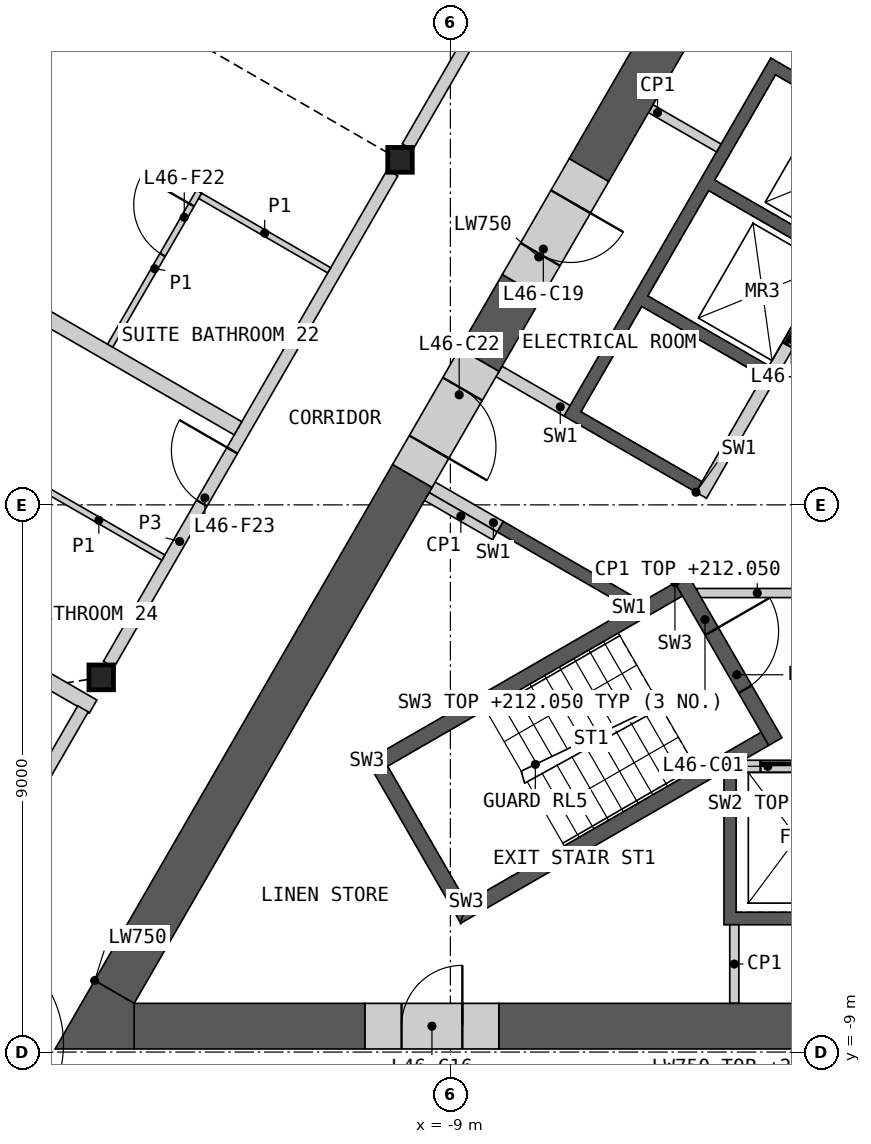
"""IFC4 building model, lengths in metres.
Left out: names, types, materials, properties, quantities, classifications, styles, units other than length and angle.
Written with IfcOpenShell. Run it as: python <this file> out.ifc"""

import sys

from ifc_helpers import new_model, si_unit, direction, frame, frame_2d, origin, origin_2d, place, context, subcontext, project, spatial, polyline, rectangle, i_section, outline, extrude, element, fill, save


model = new_model("IFC4")
c1 = context("Model", 3, precision=1e-05, world=origin(), true_north=direction((0.0, 1.0)))
c2 = subcontext(c1, "Body", "Model", "MODEL_VIEW")
j1 = project(units=[si_unit("LENGTHUNIT", "METRE"), si_unit("PLANEANGLEUNIT", "RADIAN")], contexts=[c1])
p1 = place(None, origin())
s1 = spatial("IfcSite", under=j1, at=p1, CompositionType="ELEMENT")
p2 = place(p1, origin())
s2 = spatial("IfcBuilding", under=s1, at=p2, CompositionType="ELEMENT")
p3 = place(p2, frame((0.0, 0.0, 208.8)))
s3 = spatial("IfcBuildingStorey", under=s2, at=p3, CompositionType="ELEMENT", Elevation=208.8)
for number, where, z_axis, x_axis in (
    (1, (-9.828, 5.675, 0.0), (0.0, 0.0, 1.0), (1.0, 0.0, 0.0)),
    (2, (-14.743, -2.837, 0.0), (0.0, 0.0, 1.0), (1.0, 0.0, 0.0)),
):
    element("IfcColumn", number, at=place(p3, frame(where, z_axis=z_axis, x_axis=x_axis)), inside=s3, PredefinedType="COLUMN", context=c2, shape_type="SweptSolid", body=[
        extrude(i_section(OverallWidth=0.404, OverallDepth=0.407, WebThickness=0.027, FlangeThickness=0.044, at=origin_2d()), origin(), (0.0, 0.0, 1.0), 3.6),
    ])
p4 = place(p3, origin())
e3 = element("IfcWall", 3, at=p4, inside=s3, PredefinedType="SHEAR", context=c2, shape_type="SweptSolid", body=[
    extrude(outline(polyline([(0.1, -4.4), (0.1, -6.906), (-4.5, -6.906), (-4.5, -4.4), (-4.3, -4.4), (-4.3, -6.7), (-2.3, -6.7), (-2.3, -4.4), (-2.1, -4.4), (-2.1, -6.7), (-0.1, -6.7), (-0.1, -4.4), (0.1, -4.4)])), origin(), (0.0, 0.0, 1.0), 3.25),
])
p5 = place(p3, frame((-4.187, -4.3, 0.0), z_axis=(0.0, 0.0, 1.0), x_axis=(1.0, 0.0, 0.0)))
e4 = element("IfcWall", 4, at=p5, inside=s3, PredefinedType="SOLIDWALL", context=c2, shape_type="SweptSolid", body=[
    extrude(rectangle(XDim=8.373, YDim=0.2, at=frame_2d((4.187, 0.0))), origin(), (0.0, 0.0, 1.0), 3.25),
])
p6 = place(p5, frame((0.287, 0.0, 0.0)))
e5 = element("IfcOpeningElement", 5, at=p6, cuts=e4, PredefinedType="OPENING", context=c2, shape_type="SweptSolid", body=[
    extrude(rectangle(XDim=1.2, YDim=2.1, at=frame_2d((0.6, 1.05))), frame((0.0, 0.11, 0.0), z_axis=(0.0, -1.0, 0.0), x_axis=(1.0, 0.0, 0.0)), (0.0, 0.0, 1.0), 0.22),
])
p7 = place(p5, frame((2.387, 0.0, 0.0)))
e6 = element("IfcOpeningElement", 6, at=p7, cuts=e4, PredefinedType="OPENING", context=c2, shape_type="SweptSolid", body=[
    extrude(rectangle(XDim=1.4, YDim=2.1, at=frame_2d((0.7, 1.05))), frame((0.0, 0.11, 0.0), z_axis=(0.0, -1.0, 0.0), x_axis=(1.0, 0.0, 0.0)), (0.0, 0.0, 1.0), 0.22),
])
p8 = place(p5, frame((4.837, 0.0, 0.0)))
e7 = element("IfcOpeningElement", 7, at=p8, cuts=e4, PredefinedType="OPENING", context=c2, shape_type="SweptSolid", body=[
    extrude(rectangle(XDim=0.9, YDim=2.1, at=frame_2d((0.45, 1.05))), frame((0.0, 0.11, 0.0), z_axis=(0.0, -1.0, 0.0), x_axis=(1.0, 0.0, 0.0)), (0.0, 0.0, 1.0), 0.22),
])
p9 = place(p5, frame((6.887, 0.0, 0.0)))
e8 = element("IfcOpeningElement", 8, at=p9, cuts=e4, PredefinedType="OPENING", context=c2, shape_type="SweptSolid", body=[
    extrude(rectangle(XDim=1.2, YDim=2.1, at=frame_2d((0.6, 1.05))), frame((0.0, 0.11, 0.0), z_axis=(0.0, -1.0, 0.0), x_axis=(1.0, 0.0, 0.0)), (0.0, 0.0, 1.0), 0.22),
])
p10 = place(p3, origin())
e9 = element("IfcWall", 9, at=p10, inside=s3, PredefinedType="SHEAR", context=c2, shape_type="SweptSolid", body=[
    extrude(outline(polyline([(-6.061, -1.697), (-8.231, -0.444), (-8.131, -0.271), (-5.96, -1.524), (-6.061, -1.697)])), origin(), (0.0, 0.0, 1.0), 3.25),
])
p11 = place(p3, origin())
e10 = element("IfcWall", 10, at=p11, inside=s3, PredefinedType="SHEAR", context=c2, shape_type="SweptSolid", body=[
    extrude(outline(polyline([(-4.96, 0.208), (-7.131, 1.461), (-3.731, 7.35), (-1.561, 6.097), (-1.66, 5.924), (-3.652, 7.074), (-4.652, 5.342), (-2.66, 4.192), (-2.76, 4.019), (-4.752, 5.169), (-5.752, 3.437), (-3.76, 2.287), (-3.861, 2.113), (-5.852, 3.263), (-6.852, 1.531), (-4.861, 0.381), (-4.96, 0.208)])), origin(), (0.0, 0.0, 1.0), 3.25),
])
p12 = place(p3, frame((-1.631, 5.776, 0.0), z_axis=(0.0, 0.0, 1.0), x_axis=(-0.499992876559, -0.866029516466, 0.0)))
e11 = element("IfcWall", 11, at=p12, inside=s3, PredefinedType="SOLIDWALL", context=c2, shape_type="SweptSolid", body=[
    extrude(rectangle(XDim=6.486, YDim=0.2, at=frame_2d((3.243, 0.0))), origin(), (0.0, 0.0, 1.0), 3.25),
])
p13 = place(p12, frame((0.337, 0.0, 0.0)))
e12 = element("IfcOpeningElement", 12, at=p13, cuts=e11, PredefinedType="OPENING", context=c2, shape_type="SweptSolid", body=[
    extrude(rectangle(XDim=1.1, YDim=2.1, at=frame_2d((0.55, 1.05))), frame((0.0, 0.11, 0.0), z_axis=(0.0, -1.0, 0.0), x_axis=(1.0, 0.0, 0.0)), (0.0, 0.0, 1.0), 0.22),
])
p14 = place(p12, frame((2.537, 0.0, 0.0)))
e13 = element("IfcOpeningElement", 13, at=p14, cuts=e11, PredefinedType="OPENING", context=c2, shape_type="SweptSolid", body=[
    extrude(rectangle(XDim=1.1, YDim=2.1, at=frame_2d((0.55, 1.05))), frame((0.0, 0.11, 0.0), z_axis=(0.0, -1.0, 0.0), x_axis=(1.0, 0.0, 0.0)), (0.0, 0.0, 1.0), 0.22),
])
for number, where, z_axis, x_axis in (
    (14, (-7.081, 1.548, 0.0), (0.0, 0.0, 1.0), (-0.866, 0.5, 0.0)),
    (15, (-8.181, -0.357, 0.0), (0.0, 0.0, 1.0), (-0.866, 0.5, 0.0)),
):
    element("IfcWall", number, at=place(p3, frame(where, z_axis=z_axis, x_axis=x_axis)), inside=s3, PredefinedType="SHEAR", context=c2, shape_type="SweptSolid", body=[
        extrude(rectangle(XDim=1.293, YDim=0.2, at=frame_2d((0.646, 0.0))), origin(), (0.0, 0.0, 1.0), 3.25),
    ])
p15 = place(p3, frame((-4.941, -1.45, 0.0), z_axis=(0.0, 0.0, 1.0), x_axis=(1.0, 0.0, 0.0)))
e16 = element("IfcWall", 16, at=p15, inside=s3, PredefinedType="PARTITIONING", context=c2, shape_type="SweptSolid", body=[
    extrude(rectangle(XDim=9.882, YDim=0.15, at=frame_2d((4.941, 0.0))), origin(), (0.0, 0.0, 1.0), 3.25),
])
p16 = place(p15, frame((4.391, 0.0, 0.0)))
e17 = element("IfcOpeningElement", 17, at=p16, cuts=e16, PredefinedType="OPENING", context=c2, shape_type="SweptSolid", body=[
    extrude(rectangle(XDim=1.1, YDim=2.1, at=frame_2d((0.55, 1.05))), frame((0.0, 0.085, 0.0), z_axis=(0.0, -1.0, 0.0), x_axis=(1.0, 0.0, 0.0)), (0.0, 0.0, 1.0), 0.17),
])
p17 = place(p3, origin())
e18 = element("IfcWall", 18, at=p17, inside=s3, PredefinedType="SHEAR", context=c2, shape_type="SweptSolid", body=[
    extrude(outline(polyline([(-5.307, -1.281), (-10.374, -4.206), (-10.032, -4.298), (-5.182, -1.498), (-5.307, -1.281)])), origin(), (0.0, 0.0, 1.0), 3.25),
])
p18 = place(p3, origin())
e19 = element("IfcWall", 19, at=p18, inside=s3, PredefinedType="SHEAR", context=c2, shape_type="SweptSolid", body=[
    extrude(outline(polyline([(-10.374, -4.206), (-8.83, -6.881), (-8.738, -6.539), (-10.032, -4.298), (-10.374, -4.206)])), origin(), (0.0, 0.0, 1.0), 3.25),
])
p19 = place(p3, origin())
e20 = element("IfcWall", 20, at=p19, inside=s3, PredefinedType="SHEAR", context=c2, shape_type="SweptSolid", body=[
    extrude(outline(polyline([(-8.738, -6.539), (-8.83, -6.881), (-3.763, -3.956), (-3.888, -3.739), (-8.738, -6.539)])), origin(), (0.0, 0.0, 1.0), 3.25),
])
p20 = place(p3, frame((-5.199, -1.219, 0.0), z_axis=(0.0, 0.0, 1.0), x_axis=(0.499982516597, -0.866035497597, 0.0)))
e21 = element("IfcWall", 21, at=p20, inside=s3, PredefinedType="SHEAR", context=c2, shape_type="SweptSolid", body=[
    extrude(rectangle(XDim=3.088, YDim=0.25, at=frame_2d((1.544, 0.0))), origin(), (0.0, 0.0, 1.0), 3.25),
])
p21 = place(p20, frame((0.994, 0.0, 0.0)))
e22 = element("IfcOpeningElement", 22, at=p21, cuts=e21, PredefinedType="OPENING", context=c2, shape_type="SweptSolid", body=[
    extrude(rectangle(XDim=1.1, YDim=2.1, at=frame_2d((0.55, 1.05))), frame((0.0, 0.135, 0.0), z_axis=(0.0, -1.0, 0.0), x_axis=(1.0, 0.0, 0.0)), (0.0, 0.0, 1.0), 0.27),
])
for number, where, z_axis, x_axis in (
    (23, (-8.268, -0.509, 0.0), (0.0, 0.0, 1.0), (-0.866, 0.5, 0.0)),
    (24, (-5.705, 6.516, 0.0), (0.0, 0.0, 1.0), (0.866, -0.5, 0.0)),
    (25, (-4.33, -8.199, 0.0), (0.0, 0.0, 1.0), (0.0, 1.0, 0.0)),
):
    element("IfcWall", number, at=place(p3, frame(where, z_axis=z_axis, x_axis=x_axis)), inside=s3, PredefinedType="PARTITIONING", context=c2, shape_type="SweptSolid", body=[
        extrude(rectangle(XDim=1.293, YDim=0.15, at=frame_2d((0.646, 0.0))), origin(), (0.0, 0.0, 1.0), 3.25),
    ])
p22 = place(p3, frame((-8.203, -8.574, 0.0), z_axis=(0.0, 0.0, 1.0), x_axis=(1.0, 0.0, 0.0)))
e26 = element("IfcWall", 26, at=p22, inside=s3, PredefinedType="SHEAR", context=c2, shape_type="SweptSolid", body=[
    extrude(rectangle(XDim=4.926, YDim=0.75, at=frame_2d((2.463, 0.0))), origin(), (0.0, 0.0, 1.0), 3.25),
])
p23 = place(p3, frame((-14.201, -8.574, 0.0), z_axis=(0.0, 0.0, 1.0), x_axis=(1.0, 0.0, 0.0)))
e27 = element("IfcWall", 27, at=p23, inside=s3, PredefinedType="SHEAR", context=c2, shape_type="SweptSolid", body=[
    extrude(rectangle(XDim=3.798, YDim=0.75, at=frame_2d((1.899, 0.0))), origin(), (0.0, 0.0, 1.0), 3.25),
])
p24 = place(p3, frame((-9.625, 0.477, 0.0), z_axis=(0.0, 0.0, 1.0), x_axis=(-0.499986234705, -0.866033351035, 0.0)))
e28 = element("IfcWall", 28, at=p24, inside=s3, PredefinedType="SHEAR", context=c2, shape_type="SweptSolid", body=[
    extrude(rectangle(XDim=9.801, YDim=0.75, at=frame_2d((4.9, 0.0))), origin(), (0.0, 0.0, 1.0), 3.25),
])
p25 = place(p3, frame((-3.708, 10.724, 0.0), z_axis=(0.0, 0.0, 1.0), x_axis=(-0.500021737671, -0.866012853171, 0.0)))
e29 = element("IfcWall", 29, at=p25, inside=s3, PredefinedType="SHEAR", context=c2, shape_type="SweptSolid", body=[
    extrude(rectangle(XDim=6.026, YDim=0.75, at=frame_2d((3.013, 0.0))), origin(), (0.0, 0.0, 1.0), 3.25),
])
p26 = place(p3, frame((-7.821, 3.601, 0.0), z_axis=(0.0, 0.0, 1.0), x_axis=(-0.49996263964, -0.866046972724, 0.0)))
e30 = element("IfcWall", 30, at=p26, inside=s3, PredefinedType="SHEAR", context=c2, shape_type="SweptSolid", body=[
    extrude(rectangle(XDim=1.408, YDim=0.75, at=frame_2d((0.704, 0.0))), origin(), (0.0, 0.0, 1.0), 3.25),
])
p27 = place(p3, origin())
e31 = element("IfcWall", 31, at=p27, inside=s3, PredefinedType="SHEAR", context=c2, shape_type="SweptSolid", body=[
    extrude(outline(polyline([(-14.851, -7.824), (-14.201, -8.199), (-14.201, -8.949), (-15.5, -8.949), (-14.851, -7.824)])), origin(), (0.0, 0.0, 1.0), 3.25),
])
p28 = place(p3, frame((-10.403, -8.574, 0.0), z_axis=(0.0, 0.0, 1.0), x_axis=(1.0, 0.0, 0.0)))
e32 = element("IfcWall", 32, at=p28, inside=s3, PredefinedType="SHEAR", context=c2, shape_type="SweptSolid", body=[
    extrude(rectangle(XDim=2.2, YDim=0.75, at=frame_2d((1.1, 0.0))), origin(), (0.0, 0.0, 1.0), 3.25),
])
p29 = place(p28, frame((0.6, 0.0, 0.0)))
e33 = element("IfcOpeningElement", 33, at=p29, cuts=e32, PredefinedType="OPENING", context=c2, shape_type="SweptSolid", body=[
    extrude(rectangle(XDim=1.0, YDim=2.1, at=frame_2d((0.5, 1.05))), frame((0.0, 0.385, 0.0), z_axis=(0.0, -1.0, 0.0), x_axis=(1.0, 0.0, 0.0)), (0.0, 0.0, 1.0), 0.77),
])
p30 = place(p3, frame((-6.721, 5.506, 0.0), z_axis=(0.0, 0.0, 1.0), x_axis=(-0.499946605688, -0.86605622881, 0.0)))
e34 = element("IfcWall", 34, at=p30, inside=s3, PredefinedType="SHEAR", context=c2, shape_type="SweptSolid", body=[
    extrude(rectangle(XDim=2.2, YDim=0.75, at=frame_2d((1.1, 0.0))), origin(), (0.0, 0.0, 1.0), 3.25),
])
p31 = place(p30, frame((0.6, 0.0, 0.0)))
e35 = element("IfcOpeningElement", 35, at=p31, cuts=e34, PredefinedType="OPENING", context=c2, shape_type="SweptSolid", body=[
    extrude(rectangle(XDim=1.0, YDim=2.1, at=frame_2d((0.5, 1.05))), frame((0.0, 0.385, 0.0), z_axis=(0.0, -1.0, 0.0), x_axis=(1.0, 0.0, 0.0)), (0.0, 0.0, 1.0), 0.77),
])
p32 = place(p3, frame((-8.525, 2.382, 0.0), z_axis=(0.0, 0.0, 1.0), x_axis=(-0.500077893725, -0.86598042715, 0.0)))
e36 = element("IfcWall", 36, at=p32, inside=s3, PredefinedType="SHEAR", context=c2, shape_type="SweptSolid", body=[
    extrude(rectangle(XDim=2.2, YDim=0.75, at=frame_2d((1.1, 0.0))), origin(), (0.0, 0.0, 1.0), 3.25),
])
p33 = place(p32, frame((0.55, 0.0, 0.0)))
e37 = element("IfcOpeningElement", 37, at=p33, cuts=e36, PredefinedType="OPENING", context=c2, shape_type="SweptSolid", body=[
    extrude(rectangle(XDim=1.1, YDim=2.1, at=frame_2d((0.55, 1.05))), frame((0.0, 0.385, 0.0), z_axis=(0.0, -1.0, 0.0), x_axis=(1.0, 0.0, 0.0)), (0.0, 0.0, 1.0), 0.77),
])
p34 = place(p3, frame((-26.164, 3.199, 0.0), z_axis=(0.0, 0.0, 1.0), x_axis=(0.866029635251, -0.499992670813, 0.0)))
e38 = element("IfcWall", 38, at=p34, inside=s3, PredefinedType="PARTITIONING", context=c2, shape_type="SweptSolid", body=[
    extrude(rectangle(XDim=13.035, YDim=0.25, at=frame_2d((6.518, 0.0))), origin(), (0.0, 0.0, 1.0), 2.404),
])
p35 = place(p3, frame((-9.705, 5.888, 0.0), z_axis=(0.0, 0.0, 1.0), x_axis=(0.50000393355, 0.866023132736, 0.0)))
e39 = element("IfcWall", 39, at=p35, inside=s3, PredefinedType="PARTITIONING", context=c2, shape_type="SweptSolid", body=[
    extrude(rectangle(XDim=9.335, YDim=0.2, at=frame_2d((4.667, 0.0))), origin(), (0.0, 0.0, 1.0), 3.25),
])
p36 = place(p35, frame((3.465, 0.0, 0.0)))
e40 = element("IfcOpeningElement", 40, at=p36, cuts=e39, PredefinedType="OPENING", context=c2, shape_type="SweptSolid", body=[
    extrude(rectangle(XDim=1.1, YDim=2.1, at=frame_2d((0.55, 1.05))), frame((0.0, 0.11, 0.0), z_axis=(0.0, -1.0, 0.0), x_axis=(1.0, 0.0, 0.0)), (0.0, 0.0, 1.0), 0.22),
])
p37 = place(p3, frame((-14.619, -2.624, 0.0), z_axis=(0.0, 0.0, 1.0), x_axis=(0.50000393355, 0.866023132736, 0.0)))
e41 = element("IfcWall", 41, at=p37, inside=s3, PredefinedType="PARTITIONING", context=c2, shape_type="SweptSolid", body=[
    extrude(rectangle(XDim=9.335, YDim=0.2, at=frame_2d((4.667, 0.0))), origin(), (0.0, 0.0, 1.0), 3.25),
])
p38 = place(p37, frame((3.062, 0.0, 0.0)))
e42 = element("IfcOpeningElement", 42, at=p38, cuts=e41, PredefinedType="OPENING", context=c2, shape_type="SweptSolid", body=[
    extrude(rectangle(XDim=1.0, YDim=2.1, at=frame_2d((0.5, 1.05))), frame((0.0, 0.11, 0.0), z_axis=(0.0, -1.0, 0.0), x_axis=(1.0, 0.0, 0.0)), (0.0, 0.0, 1.0), 0.22),
])
p39 = place(p3, frame((-19.555, 5.337, 0.0), z_axis=(0.0, 0.0, 1.0), x_axis=(0.866023543838, -0.500003221507, 0.0)))
e43 = element("IfcWall", 43, at=p39, inside=s3, PredefinedType="PARTITIONING", context=c2, shape_type="SweptSolid", body=[
    extrude(rectangle(XDim=8.154, YDim=0.25, at=frame_2d((4.077, 0.0))), origin(), (0.0, 0.0, 1.0), 2.404),
])
p40 = place(p3, frame((-17.744, -8.035, 0.0), z_axis=(0.0, 0.0, 1.0), x_axis=(0.500020937221, 0.866013315337, 0.0)))
e44 = element("IfcWall", 44, at=p40, inside=s3, PredefinedType="PARTITIONING", context=c2, shape_type="SweptSolid", body=[
    extrude(rectangle(XDim=5.405, YDim=0.2, at=frame_2d((2.702, 0.0))), origin(), (0.0, 0.0, 1.0), 3.25),
])
p41 = place(p40, frame((0.35, 0.0, 0.0)))
e45 = element("IfcOpeningElement", 45, at=p41, cuts=e44, PredefinedType="OPENING", context=c2, shape_type="SweptSolid", body=[
    extrude(rectangle(XDim=1.1, YDim=2.1, at=frame_2d((0.55, 1.05))), frame((0.0, 0.11, 0.0), z_axis=(0.0, -1.0, 0.0), x_axis=(1.0, 0.0, 0.0)), (0.0, 0.0, 1.0), 0.22),
])
p42 = place(p3, frame((-14.595, 2.618, 0.0), z_axis=(0.0, 0.0, 1.0), x_axis=(0.500062034277, 0.865989585315, 0.0)))
e46 = element("IfcWall", 46, at=p42, inside=s3, PredefinedType="PARTITIONING", context=c2, shape_type="SweptSolid", body=[
    extrude(rectangle(XDim=2.925, YDim=0.1, at=frame_2d((1.462, 0.0))), origin(), (0.0, 0.0, 1.0), 2.404),
])
p43 = place(p42, frame((1.725, 0.0, 0.0)))
e47 = element("IfcOpeningElement", 47, at=p43, cuts=e46, PredefinedType="OPENING", context=c2, shape_type="SweptSolid", body=[
    extrude(rectangle(XDim=0.95, YDim=2.1, at=frame_2d((0.475, 1.05))), frame((0.0, 0.06, 0.0), z_axis=(0.0, -1.0, 0.0), x_axis=(1.0, 0.0, 0.0)), (0.0, 0.0, 1.0), 0.12),
])
p44 = place(p3, frame((-15.843, 0.358, 0.0), z_axis=(0.0, 0.0, 1.0), x_axis=(0.866014668023, -0.500018594424, 0.0)))
e48 = element("IfcWall", 48, at=p44, inside=s3, PredefinedType="PARTITIONING", context=c2, shape_type="SweptSolid", body=[
    extrude(rectangle(XDim=2.45, YDim=0.1, at=frame_2d((1.225, 0.0))), origin(), (0.0, 0.0, 1.0), 2.404),
])
p45 = place(p3, frame((-13.115, 5.083, 0.0), z_axis=(0.0, 0.0, 1.0), x_axis=(0.866032905446, -0.499987006516, 0.0)))
e49 = element("IfcWall", 49, at=p45, inside=s3, PredefinedType="PARTITIONING", context=c2, shape_type="SweptSolid", body=[
    extrude(rectangle(XDim=2.45, YDim=0.1, at=frame_2d((1.225, 0.0))), origin(), (0.0, 0.0, 1.0), 2.404),
])
p46 = place(p6, origin())
e50 = element("IfcDoor", 50, at=p46, inside=s3, OperationType="SLIDING_TO_LEFT", PredefinedType="DOOR", context=c2, shape_type="SweptSolid", body=[
    extrude(rectangle(XDim=1.2, YDim=2.1, at=frame_2d((0.6, 1.05))), frame((0.0, 0.025, 0.0), z_axis=(0.0, -1.0, 0.0), x_axis=(1.0, 0.0, 0.0)), (0.0, 0.0, 1.0), 0.05),
])
fill(e5, e50)
p47 = place(p14, origin())
e51 = element("IfcDoor", 51, at=p47, inside=s3, OperationType="SLIDING_TO_LEFT", PredefinedType="DOOR", context=c2, shape_type="SweptSolid", body=[
    extrude(rectangle(XDim=1.1, YDim=2.1, at=frame_2d((0.55, 1.05))), frame((0.0, 0.025, 0.0), z_axis=(0.0, -1.0, 0.0), x_axis=(1.0, 0.0, 0.0)), (0.0, 0.0, 1.0), 0.05),
])
fill(e13, e51)
p48 = place(p21, origin())
e52 = element("IfcDoor", 52, at=p48, inside=s3, OperationType="SINGLE_SWING_LEFT", PredefinedType="DOOR", context=c2, shape_type="SweptSolid", body=[
    extrude(rectangle(XDim=1.1, YDim=2.1, at=frame_2d((0.55, 1.05))), frame((0.0, 0.025, 0.0), z_axis=(0.0, -1.0, 0.0), x_axis=(1.0, 0.0, 0.0)), (0.0, 0.0, 1.0), 0.05),
])
fill(e22, e52)
p49 = place(p29, origin())
e53 = element("IfcDoor", 53, at=p49, inside=s3, OperationType="SINGLE_SWING_RIGHT", PredefinedType="DOOR", context=c2, shape_type="SweptSolid", body=[
    extrude(rectangle(XDim=1.0, YDim=2.1, at=frame_2d((0.5, 1.05))), frame((0.0, 0.13, 0.0), z_axis=(0.0, -1.0, 0.0), x_axis=(1.0, 0.0, 0.0)), (0.0, 0.0, 1.0), 0.05),
])
fill(e33, e53)
p50 = place(p31, origin())
e54 = element("IfcDoor", 54, at=p50, inside=s3, OperationType="SINGLE_SWING_LEFT", PredefinedType="DOOR", context=c2, shape_type="SweptSolid", body=[
    extrude(rectangle(XDim=1.0, YDim=2.1, at=frame_2d((0.5, 1.05))), frame((0.0, 0.13, 0.0), z_axis=(0.0, -1.0, 0.0), x_axis=(1.0, 0.0, 0.0)), (0.0, 0.0, 1.0), 0.05),
])
fill(e35, e54)
p51 = place(p33, origin())
e55 = element("IfcDoor", 55, at=p51, inside=s3, OperationType="SINGLE_SWING_RIGHT", PredefinedType="DOOR", context=c2, shape_type="SweptSolid", body=[
    extrude(rectangle(XDim=1.1, YDim=2.1, at=frame_2d((0.55, 1.05))), frame((0.0, 0.13, 0.0), z_axis=(0.0, -1.0, 0.0), x_axis=(1.0, 0.0, 0.0)), (0.0, 0.0, 1.0), 0.05),
])
fill(e37, e55)
p52 = place(p43, origin())
e56 = element("IfcDoor", 56, at=p52, inside=s3, OperationType="SINGLE_SWING_RIGHT", PredefinedType="DOOR", context=c2, shape_type="SweptSolid", body=[
    extrude(rectangle(XDim=0.95, YDim=2.1, at=frame_2d((0.475, 1.05))), frame((0.0, 0.025, 0.0), z_axis=(0.0, -1.0, 0.0), x_axis=(1.0, 0.0, 0.0)), (0.0, 0.0, 1.0), 0.05),
])
fill(e47, e56)
p53 = place(p38, origin())
e57 = element("IfcDoor", 57, at=p53, inside=s3, OperationType="SINGLE_SWING_RIGHT", PredefinedType="DOOR", context=c2, shape_type="SweptSolid", body=[
    extrude(rectangle(XDim=1.0, YDim=2.1, at=frame_2d((0.5, 1.05))), frame((0.0, 0.025, 0.0), z_axis=(0.0, -1.0, 0.0), x_axis=(1.0, 0.0, 0.0)), (0.0, 0.0, 1.0), 0.05),
])
fill(e42, e57)
save(model, sys.argv[1])
